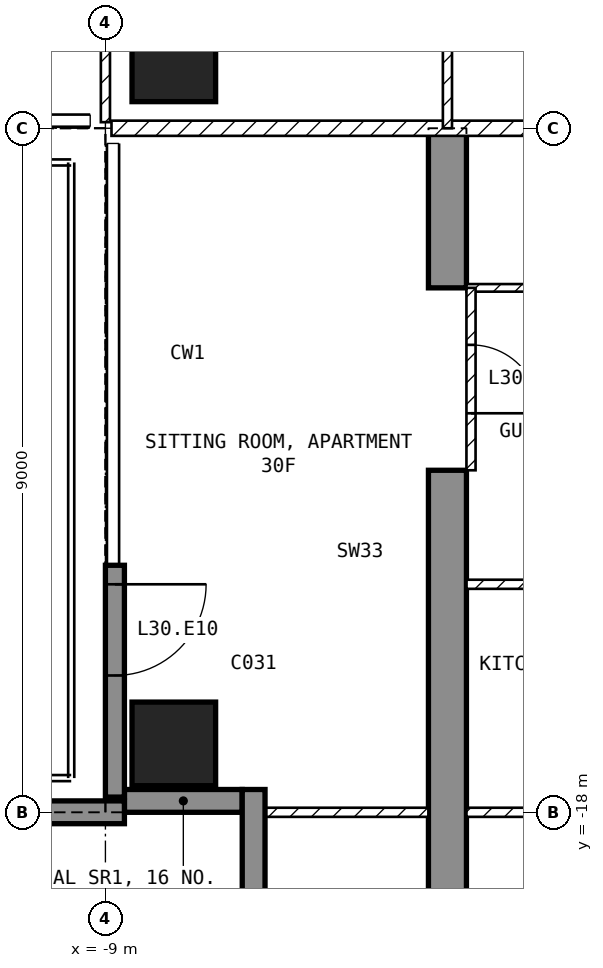
"""IFC4 building model, lengths in metres.
Left out: names, types, materials, properties, quantities, classifications, styles, units other than length and angle.
Written with IfcOpenShell. Run it as: python <this file> out.ifc"""

import sys

from ifc_helpers import new_model, si_unit, direction, frame, frame_2d, origin, origin_2d, place, context, subcontext, project, spatial, polyline, rectangle, outline, extrude, element, fill, save


model = new_model("IFC4")
c1 = context("Model", 3, precision=1e-05, world=origin(), true_north=direction((0.0, 1.0)))
c2 = subcontext(c1, "Body", "Model", "MODEL_VIEW")
j1 = project(units=[si_unit("LENGTHUNIT", "METRE"), si_unit("PLANEANGLEUNIT", "RADIAN")], contexts=[c1])
p1 = place(None, origin())
s1 = spatial("IfcSite", under=j1, at=p1, CompositionType="ELEMENT")
p2 = place(p1, origin())
s2 = spatial("IfcBuilding", under=s1, at=p2, CompositionType="ELEMENT")
p3 = place(p2, frame((0.0, 0.0, 126.9)))
s3 = spatial("IfcBuildingStorey", under=s2, at=p3, CompositionType="ELEMENT", Elevation=126.9)
for number, where, z_axis, x_axis in (
    (1, (-8.1, -17.1, -0.25), (0.0, 0.0, 1.0), (1.0, 0.0, 0.0)),
    (2, (-8.1, -8.1, -0.25), (0.0, 0.0, 1.0), (1.0, 0.0, 0.0)),
):
    element("IfcColumn", number, at=place(p3, frame(where, z_axis=z_axis, x_axis=x_axis)), inside=s3, PredefinedType="COLUMN", context=c2, shape_type="SweptSolid", body=[
        extrude(rectangle(XDim=1.1, YDim=1.1, at=origin_2d()), origin(), (0.0, 0.0, 1.0), 3.5),
    ])
p4 = place(p3, frame((-4.75, -20.15, -0.25), z_axis=(1.0, 0.0, 0.0), x_axis=(0.0, 1.0, 0.0)))
e3 = element("IfcWall", 3, at=p4, inside=s3, PredefinedType="SHEAR", context=c2, shape_type="SweptSolid", body=[
    extrude(outline(polyline([(0.0, 0.0), (6.65, 0.0), (6.65, 2.65), (9.05, 2.65), (9.05, 0.0), (11.15, 0.0), (11.15, 3.5), (0.0, 3.5), (0.0, 0.0)])), origin(), (0.0, 0.0, 1.0), 0.5),
])
p5 = place(p3, frame((-8.875, -14.75, 0.0), z_axis=(0.0, 0.0, 1.0), x_axis=(0.0, -1.0, 0.0)))
e4 = element("IfcWall", 4, at=p5, inside=s3, PredefinedType="SOLIDWALL", context=c2, shape_type="SweptSolid", body=[
    extrude(rectangle(XDim=3.05, YDim=0.25, at=frame_2d((1.525, 0.0))), origin(), (0.0, 0.0, 1.0), 3.25),
])
p6 = place(p5, frame((0.25, 0.0, 0.0)))
e5 = element("IfcOpeningElement", 5, at=p6, cuts=e4, PredefinedType="OPENING", context=c2, shape_type="SweptSolid", body=[
    extrude(rectangle(XDim=1.2, YDim=2.4, at=frame_2d((0.6, 1.2))), frame((0.0, 0.135, 0.0), z_axis=(0.0, -1.0, 0.0), x_axis=(1.0, 0.0, 0.0)), (0.0, 0.0, 1.0), 0.27),
])
p7 = place(p3, frame((-8.75, -17.85, 0.0), z_axis=(0.0, 0.0, 1.0), x_axis=(1.0, 0.0, 0.0)))
e6 = element("IfcWall", 6, at=p7, inside=s3, PredefinedType="SOLIDWALL", context=c2, shape_type="SweptSolid", body=[
    extrude(rectangle(XDim=1.55, YDim=0.3, at=frame_2d((0.775, 0.0))), origin(), (0.0, 0.0, 1.0), 3.25),
])
p8 = place(p3, frame((-7.05, -17.7, 0.0), z_axis=(0.0, 0.0, 1.0), x_axis=(0.0, -1.0, 0.0)))
e7 = element("IfcWall", 7, at=p8, inside=s3, PredefinedType="SOLIDWALL", context=c2, shape_type="SweptSolid", body=[
    extrude(rectangle(XDim=1.8, YDim=0.3, at=frame_2d((0.9, 0.0))), origin(), (0.0, 0.0, 1.0), 3.25),
])
p9 = place(p3, frame((-8.75, -18.0, 0.0), z_axis=(0.0, 0.0, 1.0), x_axis=(-1.0, 0.0, 0.0)))
e8 = element("IfcWall", 8, at=p9, inside=s3, PredefinedType="SOLIDWALL", context=c2, shape_type="SweptSolid", body=[
    extrude(rectangle(XDim=2.99, YDim=0.3, at=frame_2d((1.495, 0.0))), origin(), (0.0, 0.0, 1.0), 3.25),
])
p10 = place(p3, frame((8.92, -9.0, 0.0), z_axis=(0.0, 0.0, 1.0), x_axis=(-1.0, 0.0, 0.0)))
e9 = element("IfcWall", 9, at=p10, inside=s3, PredefinedType="PARTITIONING", context=c2, shape_type="SweptSolid", body=[
    extrude(rectangle(XDim=17.84, YDim=0.2, at=frame_2d((8.92, 0.0))), origin(), (0.0, 0.0, 1.0), 3.25),
])
p11 = place(p10, frame((8.42, 0.0, 0.0)))
e10 = element("IfcOpeningElement", 10, at=p11, cuts=e9, PredefinedType="OPENING", context=c2, shape_type="SweptSolid", body=[
    extrude(rectangle(XDim=1.0, YDim=2.1, at=frame_2d((0.5, 1.05))), frame((0.0, 0.11, 0.0), z_axis=(0.0, -1.0, 0.0), x_axis=(1.0, 0.0, 0.0)), (0.0, 0.0, 1.0), 0.22),
])
p12 = place(p3, frame((-9.0, -1.3, 0.0), z_axis=(0.0, 0.0, 1.0), x_axis=(0.0, -1.0, 0.0)))
e11 = element("IfcWall", 11, at=p12, inside=s3, PredefinedType="PARTITIONING", context=c2, shape_type="SweptSolid", body=[
    extrude(rectangle(XDim=7.62, YDim=0.12, at=frame_2d((3.81, 0.0))), origin(), (0.0, 0.0, 1.0), 3.25),
])
p13 = place(p12, frame((0.85, 0.0, 0.0)))
e12 = element("IfcOpeningElement", 12, at=p13, cuts=e11, PredefinedType="OPENING", context=c2, shape_type="SweptSolid", body=[
    extrude(rectangle(XDim=0.9, YDim=2.1, at=frame_2d((0.45, 1.05))), frame((0.0, 0.07, 0.0), z_axis=(0.0, -1.0, 0.0), x_axis=(1.0, 0.0, 0.0)), (0.0, 0.0, 1.0), 0.14),
])
p14 = place(p3, frame((-4.5, -4.5, 0.0), z_axis=(0.0, 0.0, 1.0), x_axis=(0.0, -1.0, 0.0)))
e13 = element("IfcWall", 13, at=p14, inside=s3, PredefinedType="PARTITIONING", context=c2, shape_type="SweptSolid", body=[
    extrude(rectangle(XDim=4.5, YDim=0.12, at=frame_2d((2.25, 0.0))), origin(), (0.0, 0.0, 1.0), 3.25),
])
p15 = place(p14, frame((1.8, 0.0, 0.0)))
e14 = element("IfcOpeningElement", 14, at=p15, cuts=e13, PredefinedType="OPENING", context=c2, shape_type="SweptSolid", body=[
    extrude(rectangle(XDim=0.9, YDim=2.1, at=frame_2d((0.45, 1.05))), frame((0.0, 0.07, 0.0), z_axis=(0.0, -1.0, 0.0), x_axis=(1.0, 0.0, 0.0)), (0.0, 0.0, 1.0), 0.14),
])
p16 = place(p3, frame((-2.1, -11.1, 0.0), z_axis=(0.0, 0.0, 1.0), x_axis=(-1.0, 0.0, 0.0)))
e15 = element("IfcWall", 15, at=p16, inside=s3, PredefinedType="PARTITIONING", context=c2, shape_type="SweptSolid", body=[
    extrude(rectangle(XDim=2.15, YDim=0.1, at=frame_2d((1.075, 0.0))), origin(), (0.0, 0.0, 1.0), 3.25),
])
p17 = place(p3, frame((-0.44, -15.0, 0.0), z_axis=(0.0, 0.0, 1.0), x_axis=(-1.0, 0.0, 0.0)))
e16 = element("IfcWall", 16, at=p17, inside=s3, PredefinedType="PARTITIONING", context=c2, shape_type="SweptSolid", body=[
    extrude(rectangle(XDim=3.81, YDim=0.12, at=frame_2d((1.905, 0.0))), origin(), (0.0, 0.0, 1.0), 3.25),
])
p18 = place(p3, frame((4.25, -18.0, 0.0), z_axis=(0.0, 0.0, 1.0), x_axis=(-1.0, 0.0, 0.0)))
e17 = element("IfcWall", 17, at=p18, inside=s3, PredefinedType="PARTITIONING", context=c2, shape_type="SweptSolid", body=[
    extrude(rectangle(XDim=8.5, YDim=0.12, at=frame_2d((4.25, 0.0))), origin(), (0.0, 0.0, 1.0), 3.25),
])
p19 = place(p18, frame((1.925, 0.0, 0.0)))
e18 = element("IfcOpeningElement", 18, at=p19, cuts=e17, PredefinedType="OPENING", context=c2, shape_type="SweptSolid", body=[
    extrude(rectangle(XDim=0.9, YDim=2.1, at=frame_2d((0.45, 1.05))), frame((0.0, 0.07, 0.0), z_axis=(0.0, -1.0, 0.0), x_axis=(1.0, 0.0, 0.0)), (0.0, 0.0, 1.0), 0.14),
])
p20 = place(p3, frame((-4.75, -18.0, 0.0), z_axis=(0.0, 0.0, 1.0), x_axis=(-1.0, 0.0, 0.0)))
e19 = element("IfcWall", 19, at=p20, inside=s3, PredefinedType="PARTITIONING", context=c2, shape_type="SweptSolid", body=[
    extrude(rectangle(XDim=2.37, YDim=0.12, at=frame_2d((1.185, 0.0))), origin(), (0.0, 0.0, 1.0), 3.25),
])
p21 = place(p3, frame((-4.19, -11.1, 0.0), z_axis=(0.0, 0.0, 1.0), x_axis=(0.0, -1.0, 0.0)))
e20 = element("IfcWall", 20, at=p21, inside=s3, PredefinedType="PARTITIONING", context=c2, shape_type="SweptSolid", body=[
    extrude(rectangle(XDim=2.4, YDim=0.12, at=frame_2d((1.2, 0.0))), origin(), (0.0, 0.0, 1.0), 2.4),
])
p22 = place(p21, frame((0.75, 0.0, 0.0)))
e21 = element("IfcOpeningElement", 21, at=p22, cuts=e20, PredefinedType="OPENING", context=c2, shape_type="SweptSolid", body=[
    extrude(rectangle(XDim=0.9, YDim=2.1, at=frame_2d((0.45, 1.05))), frame((0.0, 0.07, 0.0), z_axis=(0.0, -1.0, 0.0), x_axis=(1.0, 0.0, 0.0)), (0.0, 0.0, 1.0), 0.14),
])
p23 = place(p6, origin())
e22 = element("IfcDoor", 22, at=p23, inside=s3, OperationType="SINGLE_SWING_LEFT", PredefinedType="DOOR", context=c2, shape_type="SweptSolid", body=[
    extrude(rectangle(XDim=1.2, YDim=2.4, at=frame_2d((0.6, 1.2))), frame((0.0, 0.025, 0.0), z_axis=(0.0, -1.0, 0.0), x_axis=(1.0, 0.0, 0.0)), (0.0, 0.0, 1.0), 0.05),
])
fill(e5, e22)
p24 = place(p22, origin())
e23 = element("IfcDoor", 23, at=p24, inside=s3, OperationType="SINGLE_SWING_RIGHT", PredefinedType="DOOR", context=c2, shape_type="SweptSolid", body=[
    extrude(rectangle(XDim=0.9, YDim=2.1, at=frame_2d((0.45, 1.05))), frame((0.0, 0.025, 0.0), z_axis=(0.0, -1.0, 0.0), x_axis=(1.0, 0.0, 0.0)), (0.0, 0.0, 1.0), 0.05),
])
fill(e21, e23)
save(model, sys.argv[1])
